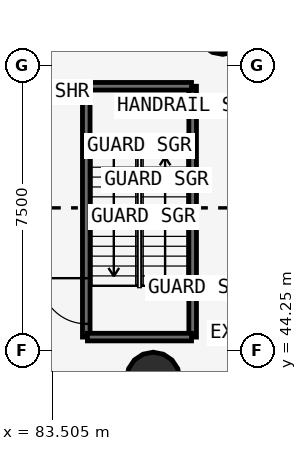
"""IFC4 building model, lengths in metres.
Left out: names, types, materials, properties, quantities, classifications, styles, units other than length and angle.
Written with IfcOpenShell. Run it as: python <this file> out.ifc"""

import sys

from ifc_helpers import new_model, si_unit, direction, frame, frame_2d, origin, origin_2d, place, context, subcontext, project, spatial, rectangle, circle, extrude, source, transform, mapped, element, fill, save


model = new_model("IFC4")
c1 = context("Model", 3, precision=1e-05, world=origin(), true_north=direction((0.0, 1.0)))
c2 = subcontext(c1, "Body", "Model", "MODEL_VIEW")
j1 = project(units=[si_unit("LENGTHUNIT", "METRE"), si_unit("PLANEANGLEUNIT", "RADIAN")], contexts=[c1])
p1 = place(None, origin())
s1 = spatial("IfcSite", under=j1, at=p1, CompositionType="ELEMENT")
p2 = place(p1, origin())
s2 = spatial("IfcBuilding", under=s1, at=p2, CompositionType="ELEMENT")
p3 = place(p2, origin())
s3 = spatial("IfcBuildingStorey", under=s2, at=p3, CompositionType="ELEMENT", Elevation=0.0)
m1 = source(origin(), c2, "Body", "SweptSolid", [
    extrude(circle(Radius=0.7, at=origin_2d()), origin(), (0.0, 0.0, 1.0), 5.35),
])
for number, where, z_axis, x_axis in (
    (1, (87.99, 52.738, -0.35), (0.0, 0.0, 1.0), (1.0, 0.0, 0.0)),
    (2, (86.161, 43.503, -0.35), (0.0, 0.0, 1.0), (1.0, 0.0, 0.0)),
):
    element("IfcColumn", number, at=place(p3, frame(where, z_axis=z_axis, x_axis=x_axis)), inside=s3, PredefinedType="COLUMN", context=c2, shape_type="MappedRepresentation", body=[
        mapped(m1, transform((0.0, 0.0, 0.0), scale=1.0)),
    ])
p4 = place(p3, frame((87.2, 44.6, 0.0), z_axis=(0.0, 0.0, 1.0), x_axis=(0.0, 1.0, 0.0)))
e3 = element("IfcWall", 3, at=p4, inside=s3, PredefinedType="SOLIDWALL", context=c2, shape_type="SweptSolid", body=[
    extrude(rectangle(XDim=6.6, YDim=0.2, at=frame_2d((3.3, 0.0))), origin(), (0.0, 0.0, 1.0), 4.65),
])
p5 = place(p3, frame((84.4, 44.6, 0.0), z_axis=(0.0, 0.0, 1.0), x_axis=(0.0, 1.0, 0.0)))
e4 = element("IfcWall", 4, at=p5, inside=s3, PredefinedType="SOLIDWALL", context=c2, shape_type="SweptSolid", body=[
    extrude(rectangle(XDim=6.6, YDim=0.2, at=frame_2d((3.3, 0.0))), origin(), (0.0, 0.0, 1.0), 4.65),
])
p6 = place(p5, frame((0.35, 0.0, 0.0)))
e5 = element("IfcOpeningElement", 5, at=p6, cuts=e4, PredefinedType="OPENING", context=c2, shape_type="SweptSolid", body=[
    extrude(rectangle(XDim=1.2, YDim=2.1, at=frame_2d((0.6, 1.05))), frame((0.0, 0.11, 0.0), z_axis=(0.0, -1.0, 0.0), x_axis=(1.0, 0.0, 0.0)), (0.0, 0.0, 1.0), 0.22),
])
for number, where, z_axis, x_axis in (
    (6, (84.43, 44.6, 0.0), (0.0, 0.0, 1.0), (1.0, 0.0, 0.0)),
    (7, (87.17, 51.2, 0.0), (0.0, 0.0, 1.0), (-1.0, 0.0, 0.0)),
):
    element("IfcWall", number, at=place(p3, frame(where, z_axis=z_axis, x_axis=x_axis)), inside=s3, PredefinedType="SOLIDWALL", context=c2, shape_type="SweptSolid", body=[
        extrude(rectangle(XDim=2.74, YDim=0.2, at=frame_2d((1.37, 0.0))), origin(), (0.0, 0.0, 1.0), 4.65),
    ])
m2 = source(origin(), c2, "Body", "SweptSolid", [
    extrude(rectangle(XDim=1.2, YDim=2.1, at=frame_2d((0.6, 1.05))), frame((0.0, 0.025, 0.0), z_axis=(0.0, -1.0, 0.0), x_axis=(1.0, 0.0, 0.0)), (0.0, 0.0, 1.0), 0.05),
])
p7 = place(p6, origin())
e8 = element("IfcDoor", 8, at=p7, inside=s3, OperationType="SINGLE_SWING_RIGHT", PredefinedType="DOOR", context=c2, shape_type="MappedRepresentation", body=[
    mapped(m2, transform((0.0, 0.0, 0.0), scale=1.0)),
])
fill(e5, e8)
save(model, sys.argv[1])
